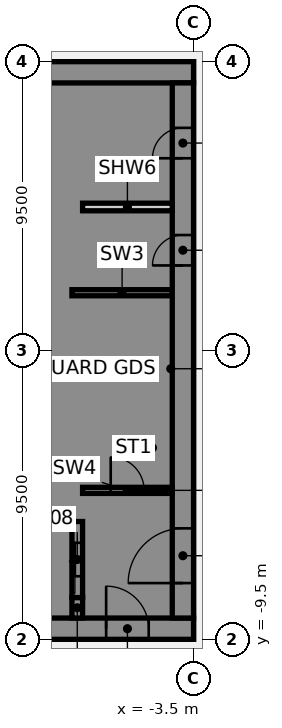
"""IFC4 building model, lengths in metres.
Left out: names, types, materials, properties, quantities, classifications, styles, units other than length and angle.
Written with IfcOpenShell. Run it as: python <this file> out.ifc"""

import sys

from ifc_helpers import new_model, si_unit, direction, frame, frame_2d, origin, place, context, subcontext, project, spatial, polyline, rectangle, outline, extrude, element, fill, save


model = new_model("IFC4")
c1 = context("Model", 3, precision=1e-05, world=origin(), true_north=direction((0.0, 1.0)))
c2 = subcontext(c1, "Body", "Model", "MODEL_VIEW")
j1 = project(units=[si_unit("LENGTHUNIT", "METRE"), si_unit("PLANEANGLEUNIT", "RADIAN")], contexts=[c1])
p1 = place(None, origin())
s1 = spatial("IfcSite", under=j1, at=p1, CompositionType="ELEMENT")
p2 = place(p1, origin())
s2 = spatial("IfcBuilding", under=s1, at=p2, CompositionType="ELEMENT")
p3 = place(p2, frame((0.0, 0.0, 41.5)))
s3 = spatial("IfcBuildingStorey", under=s2, at=p3, CompositionType="ELEMENT", Elevation=41.5)
p4 = place(p3, frame((-16.5, -9.15, 0.0), z_axis=(0.0, 0.0, 1.0), x_axis=(1.0, 0.0, 0.0)))
e1 = element("IfcWall", 1, at=p4, inside=s3, PredefinedType="SHEAR", context=c2, shape_type="SweptSolid", body=[
    extrude(rectangle(XDim=13.0, YDim=0.7, at=frame_2d((6.5, 0.0))), origin(), (0.0, 0.0, 1.0), 3.61),
])
p5 = place(p4, frame((4.15, 0.0, 0.0)))
e2 = element("IfcOpeningElement", 2, at=p5, cuts=e1, PredefinedType="OPENING", context=c2, shape_type="SweptSolid", body=[
    extrude(rectangle(XDim=1.4, YDim=2.1, at=frame_2d((0.7, 1.05))), frame((0.0, 0.36, 0.0), z_axis=(0.0, -1.0, 0.0), x_axis=(1.0, 0.0, 0.0)), (0.0, 0.0, 1.0), 0.72),
])
p6 = place(p4, frame((10.125, 0.0, 0.0)))
e3 = element("IfcOpeningElement", 3, at=p6, cuts=e1, PredefinedType="OPENING", context=c2, shape_type="SweptSolid", body=[
    extrude(rectangle(XDim=1.4, YDim=2.1, at=frame_2d((0.7, 1.05))), frame((0.0, 0.36, 0.0), z_axis=(0.0, -1.0, 0.0), x_axis=(1.0, 0.0, 0.0)), (0.0, 0.0, 1.0), 0.72),
])
p7 = place(p3, frame((-16.5, 9.15, 0.0), z_axis=(0.0, 0.0, 1.0), x_axis=(1.0, 0.0, 0.0)))
e4 = element("IfcWall", 4, at=p7, inside=s3, PredefinedType="SHEAR", context=c2, shape_type="SweptSolid", body=[
    extrude(rectangle(XDim=13.0, YDim=0.7, at=frame_2d((6.5, 0.0))), origin(), (0.0, 0.0, 1.0), 3.61),
])
p8 = place(p3, origin())
e5 = element("IfcWall", 5, at=p8, inside=s3, PredefinedType="SHEAR", context=c2, shape_type="SweptSolid", body=[
    extrude(outline(polyline([(-9.8, -5.375), (-9.8, -5.625), (-7.5, -5.625), (-7.15, -5.625), (-7.15, 8.8), (-7.5, 8.8), (-9.8, 8.8), (-9.8, 8.125), (-7.5, 8.125), (-7.5, 5.625), (-9.8, 5.625), (-9.8, 5.375), (-7.5, 5.375), (-7.5, 2.875), (-9.8, 2.875), (-9.8, 2.625), (-7.5, 2.625), (-7.5, 0.125), (-9.8, 0.125), (-9.8, -0.125), (-7.5, -0.125), (-7.5, -2.625), (-9.8, -2.625), (-9.8, -2.875), (-7.5, -2.875), (-7.5, -5.375), (-9.8, -5.375)])), origin(), (0.0, 0.0, 1.0), 3.61),
])
p9 = place(p3, origin())
e6 = element("IfcWall", 6, at=p9, inside=s3, PredefinedType="SHEAR", context=c2, shape_type="SweptSolid", body=[
    extrude(outline(polyline([(-7.5, -8.125), (-9.55, -8.125), (-9.55, -5.625), (-9.8, -5.625), (-9.8, -8.125), (-9.8, -8.8), (-7.5, -8.8), (-7.5, -8.125)])), origin(), (0.0, 0.0, 1.0), 3.61),
])
p10 = place(p3, frame((-7.325, -8.8, 0.0), z_axis=(0.0, 0.0, 1.0), x_axis=(0.0, 1.0, 0.0)))
e7 = element("IfcWall", 7, at=p10, inside=s3, PredefinedType="SHEAR", context=c2, shape_type="SweptSolid", body=[
    extrude(rectangle(XDim=0.675, YDim=0.35, at=frame_2d((0.337, 0.0))), origin(), (0.0, 0.0, 1.0), 3.61),
])
p11 = place(p3, frame((-7.5, 1.9, 0.0), z_axis=(0.0, 0.0, 1.0), x_axis=(1.0, 0.0, 0.0)))
e8 = element("IfcWall", 8, at=p11, inside=s3, PredefinedType="SHEAR", context=c2, shape_type="SweptSolid", body=[
    extrude(rectangle(XDim=3.3, YDim=0.2, at=frame_2d((1.65, 0.0))), origin(), (0.0, 0.0, 1.0), 3.61),
])
p12 = place(p3, frame((-7.325, -8.125, 0.0), z_axis=(0.0, 0.0, 1.0), x_axis=(0.0, 1.0, 0.0)))
e9 = element("IfcWall", 9, at=p12, inside=s3, PredefinedType="SHEAR", context=c2, shape_type="SweptSolid", body=[
    extrude(rectangle(XDim=2.5, YDim=0.35, at=frame_2d((1.25, 0.0))), origin(), (0.0, 0.0, 1.0), 3.61),
])
p13 = place(p12, frame((0.7, 0.0, 0.0)))
e10 = element("IfcOpeningElement", 10, at=p13, cuts=e9, PredefinedType="OPENING", context=c2, shape_type="SweptSolid", body=[
    extrude(rectangle(XDim=1.1, YDim=2.1, at=frame_2d((0.55, 1.05))), frame((0.0, 0.185, 0.0), z_axis=(0.0, -1.0, 0.0), x_axis=(1.0, 0.0, 0.0)), (0.0, 0.0, 1.0), 0.37),
])
p14 = place(p3, frame((-3.85, -8.8, 0.0), z_axis=(0.0, 0.0, 1.0), x_axis=(0.0, 1.0, 0.0)))
e11 = element("IfcWall", 11, at=p14, inside=s3, PredefinedType="SHEAR", context=c2, shape_type="SweptSolid", body=[
    extrude(rectangle(XDim=17.6, YDim=0.7, at=frame_2d((8.8, 0.0))), origin(), (0.0, 0.0, 1.0), 3.61),
])
p15 = place(p14, frame((1.15, 0.0, 0.0)))
e12 = element("IfcOpeningElement", 12, at=p15, cuts=e11, PredefinedType="OPENING", context=c2, shape_type="SweptSolid", body=[
    extrude(rectangle(XDim=1.8, YDim=2.1, at=frame_2d((0.9, 1.05))), frame((0.0, 0.36, 0.0), z_axis=(0.0, -1.0, 0.0), x_axis=(1.0, 0.0, 0.0)), (0.0, 0.0, 1.0), 0.72),
])
p16 = place(p14, frame((11.597, 0.0, 0.0)))
e13 = element("IfcOpeningElement", 13, at=p16, cuts=e11, PredefinedType="OPENING", context=c2, shape_type="SweptSolid", body=[
    extrude(rectangle(XDim=1.0, YDim=2.1, at=frame_2d((0.5, 1.05))), frame((0.0, 0.36, 0.0), z_axis=(0.0, -1.0, 0.0), x_axis=(1.0, 0.0, 0.0)), (0.0, 0.0, 1.0), 0.72),
])
p17 = place(p14, frame((15.123, 0.0, 0.0)))
e14 = element("IfcOpeningElement", 14, at=p17, cuts=e11, PredefinedType="OPENING", context=c2, shape_type="SweptSolid", body=[
    extrude(rectangle(XDim=1.0, YDim=2.1, at=frame_2d((0.5, 1.05))), frame((0.0, 0.36, 0.0), z_axis=(0.0, -1.0, 0.0), x_axis=(1.0, 0.0, 0.0)), (0.0, 0.0, 1.0), 0.72),
])
p18 = place(p3, frame((-7.15, 4.72, 0.0), z_axis=(0.0, 0.0, 1.0), x_axis=(1.0, 0.0, 0.0)))
e15 = element("IfcWall", 15, at=p18, inside=s3, PredefinedType="PARTITIONING", context=c2, shape_type="SweptSolid", body=[
    extrude(rectangle(XDim=2.95, YDim=0.25, at=frame_2d((1.475, 0.0))), origin(), (0.0, 0.0, 1.0), 3.61),
])
p19 = place(p3, frame((-7.15, -4.6, 0.0), z_axis=(0.0, 0.0, 1.0), x_axis=(1.0, 0.0, 0.0)))
e16 = element("IfcWall", 16, at=p19, inside=s3, PredefinedType="SHEAR", context=c2, shape_type="SweptSolid", body=[
    extrude(rectangle(XDim=2.95, YDim=0.2, at=frame_2d((1.475, 0.0))), origin(), (0.0, 0.0, 1.0), 3.61),
])
p20 = place(p19, frame((0.925, 0.0, 0.0)))
e17 = element("IfcOpeningElement", 17, at=p20, cuts=e16, PredefinedType="OPENING", context=c2, shape_type="SweptSolid", body=[
    extrude(rectangle(XDim=1.1, YDim=2.1, at=frame_2d((0.55, 1.05))), frame((0.0, 0.11, 0.0), z_axis=(0.0, -1.0, 0.0), x_axis=(1.0, 0.0, 0.0)), (0.0, 0.0, 1.0), 0.22),
])
p21 = place(p6, origin())
e18 = element("IfcDoor", 18, at=p21, inside=s3, OperationType="SINGLE_SWING_LEFT", PredefinedType="DOOR", context=c2, shape_type="SweptSolid", body=[
    extrude(rectangle(XDim=1.4, YDim=2.1, at=frame_2d((0.7, 1.05))), frame((0.0, 0.025, 0.0), z_axis=(0.0, -1.0, 0.0), x_axis=(1.0, 0.0, 0.0)), (0.0, 0.0, 1.0), 0.05),
])
fill(e3, e18)
p22 = place(p15, origin())
e19 = element("IfcDoor", 19, at=p22, inside=s3, OperationType="SINGLE_SWING_LEFT", PredefinedType="DOOR", context=c2, shape_type="SweptSolid", body=[
    extrude(rectangle(XDim=1.8, YDim=2.1, at=frame_2d((0.9, 1.05))), frame((0.0, 0.025, 0.0), z_axis=(0.0, -1.0, 0.0), x_axis=(1.0, 0.0, 0.0)), (0.0, 0.0, 1.0), 0.05),
])
fill(e12, e19)
p23 = place(p16, origin())
e20 = element("IfcDoor", 20, at=p23, inside=s3, OperationType="SINGLE_SWING_LEFT", PredefinedType="DOOR", context=c2, shape_type="SweptSolid", body=[
    extrude(rectangle(XDim=1.0, YDim=2.1, at=frame_2d((0.5, 1.05))), frame((0.0, 0.325, 0.0), z_axis=(0.0, -1.0, 0.0), x_axis=(1.0, 0.0, 0.0)), (0.0, 0.0, 1.0), 0.05),
])
fill(e13, e20)
p24 = place(p17, origin())
e21 = element("IfcDoor", 21, at=p24, inside=s3, OperationType="SINGLE_SWING_LEFT", PredefinedType="DOOR", context=c2, shape_type="SweptSolid", body=[
    extrude(rectangle(XDim=1.0, YDim=2.1, at=frame_2d((0.5, 1.05))), frame((0.0, 0.325, 0.0), z_axis=(0.0, -1.0, 0.0), x_axis=(1.0, 0.0, 0.0)), (0.0, 0.0, 1.0), 0.05),
])
fill(e14, e21)
p25 = place(p20, origin())
e22 = element("IfcDoor", 22, at=p25, inside=s3, OperationType="SINGLE_SWING_LEFT", PredefinedType="DOOR", context=c2, shape_type="SweptSolid", body=[
    extrude(rectangle(XDim=1.1, YDim=2.1, at=frame_2d((0.55, 1.05))), frame((0.0, 0.025, 0.0), z_axis=(0.0, -1.0, 0.0), x_axis=(1.0, 0.0, 0.0)), (0.0, 0.0, 1.0), 0.05),
])
fill(e17, e22)
p26 = place(p13, origin())
e23 = element("IfcDoor", 23, at=p26, inside=s3, OperationType="SLIDING_TO_LEFT", PredefinedType="DOOR", context=c2, shape_type="SweptSolid", body=[
    extrude(rectangle(XDim=1.1, YDim=2.1, at=frame_2d((0.55, 1.05))), frame((0.0, 0.025, 0.0), z_axis=(0.0, -1.0, 0.0), x_axis=(1.0, 0.0, 0.0)), (0.0, 0.0, 1.0), 0.05),
])
fill(e10, e23)
save(model, sys.argv[1])
